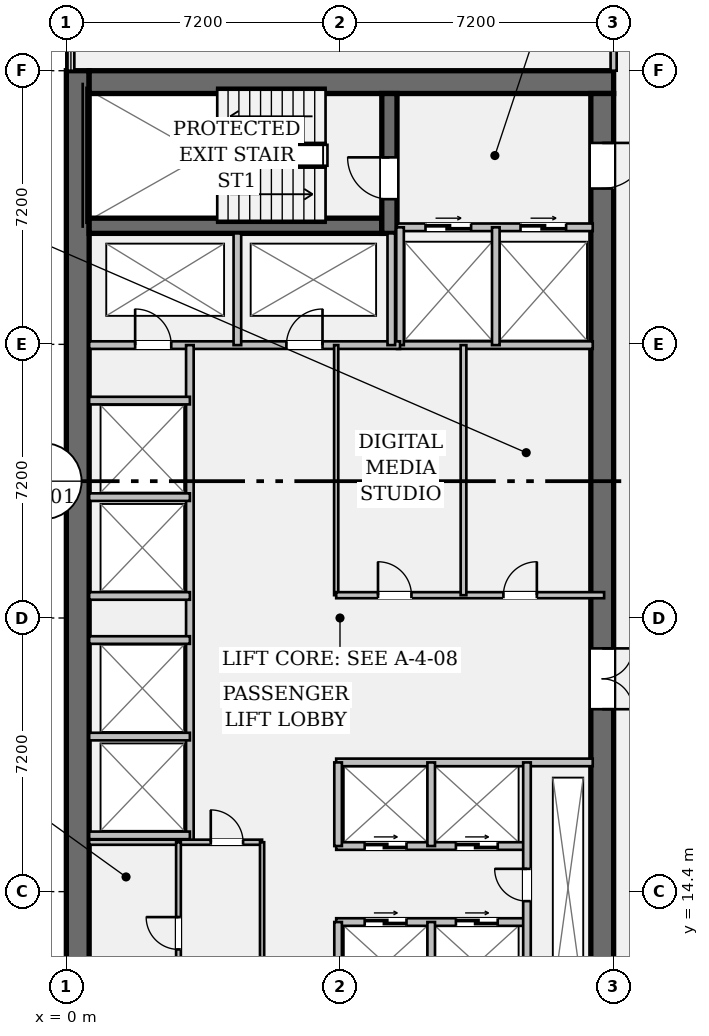
"""IFC4 building model, lengths in metres.
Left out: names, types, materials, properties, quantities, classifications, styles, units other than length and angle.
Written with IfcOpenShell. Run it as: python <this file> out.ifc"""

import sys

from ifc_helpers import new_model, si_unit, direction, frame, frame_2d, origin, place, context, subcontext, project, spatial, rectangle, extrude, element, fill, save


model = new_model("IFC4")
c1 = context("Model", 3, precision=1e-05, world=origin(), true_north=direction((0.0, 1.0)))
c2 = subcontext(c1, "Body", "Model", "MODEL_VIEW")
j1 = project(units=[si_unit("LENGTHUNIT", "METRE"), si_unit("PLANEANGLEUNIT", "RADIAN")], contexts=[c1])
p1 = place(None, origin())
s1 = spatial("IfcSite", under=j1, at=p1, CompositionType="ELEMENT")
p2 = place(p1, origin())
s2 = spatial("IfcBuilding", under=s1, at=p2, CompositionType="ELEMENT")
p3 = place(p2, frame((0.0, 0.0, 106.05)))
s3 = spatial("IfcBuildingStorey", under=s2, at=p3, CompositionType="ELEMENT", Elevation=106.05)
p4 = place(p3, frame((0.3, 7.2, 0.0), z_axis=(0.0, 0.0, 1.0), x_axis=(0.0, 1.0, 0.0)))
e1 = element("IfcWall", 1, at=p4, inside=s3, PredefinedType="SHEAR", context=c2, shape_type="SweptSolid", body=[
    extrude(rectangle(XDim=28.8, YDim=0.6, at=frame_2d((14.4, 0.0))), origin(), (0.0, 0.0, 1.0), 3.58),
])
p5 = place(p3, frame((0.6, 35.7, 0.0), z_axis=(0.0, 0.0, 1.0), x_axis=(1.0, 0.0, 0.0)))
e2 = element("IfcWall", 2, at=p5, inside=s3, PredefinedType="SHEAR", context=c2, shape_type="SweptSolid", body=[
    extrude(rectangle(XDim=13.8, YDim=0.6, at=frame_2d((6.9, 0.0))), origin(), (0.0, 0.0, 1.0), 3.58),
])
p6 = place(p3, frame((14.1, 35.4, 0.0), z_axis=(0.0, 0.0, 1.0), x_axis=(0.0, -1.0, 0.0)))
e3 = element("IfcWall", 3, at=p6, inside=s3, PredefinedType="SHEAR", context=c2, shape_type="SweptSolid", body=[
    extrude(rectangle(XDim=27.6, YDim=0.6, at=frame_2d((13.8, 0.0))), origin(), (0.0, 0.0, 1.0), 3.58),
])
p7 = place(p6, frame((1.3, 0.0, 0.0)))
e4 = element("IfcOpeningElement", 4, at=p7, cuts=e3, PredefinedType="OPENING", context=c2, shape_type="SweptSolid", body=[
    extrude(rectangle(XDim=1.2, YDim=2.15, at=frame_2d((0.6, 1.075))), frame((0.0, 0.312, 0.0), z_axis=(0.0, -1.0, 0.0), x_axis=(1.0, 0.0, 0.0)), (0.0, 0.0, 1.0), 0.624),
])
p8 = place(p6, frame((25.25, 0.0, 0.0)))
e5 = element("IfcOpeningElement", 5, at=p8, cuts=e3, PredefinedType="OPENING", context=c2, shape_type="SweptSolid", body=[
    extrude(rectangle(XDim=1.2, YDim=2.15, at=frame_2d((0.6, 1.075))), frame((0.0, 0.312, 0.0), z_axis=(0.0, -1.0, 0.0), x_axis=(1.0, 0.0, 0.0)), (0.0, 0.0, 1.0), 0.624),
])
p9 = place(p6, frame((14.6, 0.0, 0.0)))
e6 = element("IfcOpeningElement", 6, at=p9, cuts=e3, PredefinedType="OPENING", context=c2, shape_type="SweptSolid", body=[
    extrude(rectangle(XDim=1.6, YDim=2.2, at=frame_2d((0.8, 1.1))), frame((0.0, 0.312, 0.0), z_axis=(0.0, -1.0, 0.0), x_axis=(1.0, 0.0, 0.0)), (0.0, 0.0, 1.0), 0.624),
])
p10 = place(p3, frame((0.6, 31.92, 0.0), z_axis=(0.0, 0.0, 1.0), x_axis=(1.0, 0.0, 0.0)))
e7 = element("IfcWall", 7, at=p10, inside=s3, PredefinedType="SHEAR", context=c2, shape_type="SweptSolid", body=[
    extrude(rectangle(XDim=7.7, YDim=0.4, at=frame_2d((3.85, 0.0))), origin(), (0.0, 0.0, 1.0), 3.58),
])
p11 = place(p3, frame((8.5, 31.72, 0.0), z_axis=(0.0, 0.0, 1.0), x_axis=(0.0, 1.0, 0.0)))
e8 = element("IfcWall", 8, at=p11, inside=s3, PredefinedType="SHEAR", context=c2, shape_type="SweptSolid", body=[
    extrude(rectangle(XDim=3.68, YDim=0.4, at=frame_2d((1.84, 0.0))), origin(), (0.0, 0.0, 1.0), 3.58),
])
p12 = place(p11, frame((0.9, 0.0, 0.0)))
e9 = element("IfcOpeningElement", 9, at=p12, cuts=e8, PredefinedType="OPENING", context=c2, shape_type="SweptSolid", body=[
    extrude(rectangle(XDim=1.1, YDim=2.15, at=frame_2d((0.55, 1.075))), frame((0.0, 0.212, 0.0), z_axis=(0.0, -1.0, 0.0), x_axis=(1.0, 0.0, 0.0)), (0.0, 0.0, 1.0), 0.424),
])
p13 = place(p3, frame((8.7, 31.88, 0.0), z_axis=(0.0, 0.0, 1.0), x_axis=(1.0, 0.0, 0.0)))
e10 = element("IfcWall", 10, at=p13, inside=s3, PredefinedType="PARTITIONING", context=c2, shape_type="SweptSolid", body=[
    extrude(rectangle(XDim=5.15, YDim=0.2, at=frame_2d((2.575, 0.0))), origin(), (0.0, 0.0, 1.0), 3.58),
])
p14 = place(p13, frame((0.75, 0.0, 0.0)))
e11 = element("IfcOpeningElement", 11, at=p14, cuts=e10, PredefinedType="OPENING", context=c2, shape_type="SweptSolid", body=[
    extrude(rectangle(XDim=1.2, YDim=2.2, at=frame_2d((0.6, 1.1))), frame((0.0, 0.112, 0.0), z_axis=(0.0, -1.0, 0.0), x_axis=(1.0, 0.0, 0.0)), (0.0, 0.0, 1.0), 0.224),
])
p15 = place(p13, frame((3.25, 0.0, 0.0)))
e12 = element("IfcOpeningElement", 12, at=p15, cuts=e10, PredefinedType="OPENING", context=c2, shape_type="SweptSolid", body=[
    extrude(rectangle(XDim=1.2, YDim=2.2, at=frame_2d((0.6, 1.1))), frame((0.0, 0.112, 0.0), z_axis=(0.0, -1.0, 0.0), x_axis=(1.0, 0.0, 0.0)), (0.0, 0.0, 1.0), 0.224),
])
p16 = place(p3, frame((8.7, 28.78, 0.0), z_axis=(0.0, 0.0, 1.0), x_axis=(1.0, 0.0, 0.0)))
e13 = element("IfcWall", 13, at=p16, inside=s3, PredefinedType="PARTITIONING", context=c2, shape_type="SweptSolid", body=[
    extrude(rectangle(XDim=5.15, YDim=0.2, at=frame_2d((2.575, 0.0))), origin(), (0.0, 0.0, 1.0), 3.58),
])
for number, where, z_axis, x_axis in (
    (14, (8.78, 28.78, 0.0), (0.0, 0.0, 1.0), (0.0, 1.0, 0.0)),
    (15, (11.3, 28.78, 0.0), (0.0, 0.0, 1.0), (0.0, 1.0, 0.0)),
):
    element("IfcWall", number, at=place(p3, frame(where, z_axis=z_axis, x_axis=x_axis)), inside=s3, PredefinedType="PARTITIONING", context=c2, shape_type="SweptSolid", body=[
        extrude(rectangle(XDim=3.1, YDim=0.2, at=frame_2d((1.55, 0.0))), origin(), (0.0, 0.0, 1.0), 3.58),
    ])
p17 = place(p3, frame((0.6, 28.78, 0.0), z_axis=(0.0, 0.0, 1.0), x_axis=(1.0, 0.0, 0.0)))
e16 = element("IfcWall", 16, at=p17, inside=s3, PredefinedType="PARTITIONING", context=c2, shape_type="SweptSolid", body=[
    extrude(rectangle(XDim=8.18, YDim=0.2, at=frame_2d((4.09, 0.0))), origin(), (0.0, 0.0, 1.0), 3.58),
])
p18 = place(p17, frame((1.21, 0.0, 0.0)))
e17 = element("IfcOpeningElement", 17, at=p18, cuts=e16, PredefinedType="OPENING", context=c2, shape_type="SweptSolid", body=[
    extrude(rectangle(XDim=0.95, YDim=2.15, at=frame_2d((0.475, 1.075))), frame((0.0, 0.112, 0.0), z_axis=(0.0, -1.0, 0.0), x_axis=(1.0, 0.0, 0.0)), (0.0, 0.0, 1.0), 0.224),
])
p19 = place(p17, frame((5.19, 0.0, 0.0)))
e18 = element("IfcOpeningElement", 18, at=p19, cuts=e16, PredefinedType="OPENING", context=c2, shape_type="SweptSolid", body=[
    extrude(rectangle(XDim=0.95, YDim=2.15, at=frame_2d((0.475, 1.075))), frame((0.0, 0.112, 0.0), z_axis=(0.0, -1.0, 0.0), x_axis=(1.0, 0.0, 0.0)), (0.0, 0.0, 1.0), 0.224),
])
for number, where, z_axis, x_axis in (
    (19, (4.5, 28.78, 0.0), (0.0, 0.0, 1.0), (0.0, 1.0, 0.0)),
    (20, (8.55, 28.78, 0.0), (0.0, 0.0, 1.0), (0.0, 1.0, 0.0)),
):
    element("IfcWall", number, at=place(p3, frame(where, z_axis=z_axis, x_axis=x_axis)), inside=s3, PredefinedType="PARTITIONING", context=c2, shape_type="SweptSolid", body=[
        extrude(rectangle(XDim=2.94, YDim=0.2, at=frame_2d((1.47, 0.0))), origin(), (0.0, 0.0, 1.0), 3.58),
    ])
p20 = place(p3, frame((3.25, 15.7, 0.0), z_axis=(0.0, 0.0, 1.0), x_axis=(0.0, 1.0, 0.0)))
e21 = element("IfcWall", 21, at=p20, inside=s3, PredefinedType="PARTITIONING", context=c2, shape_type="SweptSolid", body=[
    extrude(rectangle(XDim=13.08, YDim=0.2, at=frame_2d((6.54, 0.0))), origin(), (0.0, 0.0, 1.0), 3.58),
])
for number, where, z_axis, x_axis in (
    (22, (0.6, 15.88, 0.0), (0.0, 0.0, 1.0), (1.0, 0.0, 0.0)),
    (23, (0.6, 18.48, 0.0), (0.0, 0.0, 1.0), (1.0, 0.0, 0.0)),
    (24, (0.6, 22.18, 0.0), (0.0, 0.0, 1.0), (1.0, 0.0, 0.0)),
    (25, (0.6, 24.78, 0.0), (0.0, 0.0, 1.0), (1.0, 0.0, 0.0)),
    (26, (0.6, 21.02, 0.0), (0.0, 0.0, 1.0), (1.0, 0.0, 0.0)),
    (27, (0.6, 27.32, 0.0), (0.0, 0.0, 1.0), (1.0, 0.0, 0.0)),
):
    element("IfcWall", number, at=place(p3, frame(where, z_axis=z_axis, x_axis=x_axis)), inside=s3, PredefinedType="PARTITIONING", context=c2, shape_type="SweptSolid", body=[
        extrude(rectangle(XDim=2.65, YDim=0.2, at=frame_2d((1.325, 0.0))), origin(), (0.0, 0.0, 1.0), 3.58),
    ])
p21 = place(p3, frame((7.1, 22.2, 0.0), z_axis=(0.0, 0.0, 1.0), x_axis=(0.0, 1.0, 0.0)))
e28 = element("IfcWall", 28, at=p21, inside=s3, PredefinedType="PARTITIONING", context=c2, shape_type="SweptSolid", body=[
    extrude(rectangle(XDim=6.58, YDim=0.11, at=frame_2d((3.29, 0.0))), origin(), (0.0, 0.0, 1.0), 3.58),
])
p22 = place(p3, frame((7.1, 22.2, 0.0), z_axis=(0.0, 0.0, 1.0), x_axis=(1.0, 0.0, 0.0)))
e29 = element("IfcWall", 29, at=p22, inside=s3, PredefinedType="PARTITIONING", context=c2, shape_type="SweptSolid", body=[
    extrude(rectangle(XDim=7.05, YDim=0.16, at=frame_2d((3.525, 0.0))), origin(), (0.0, 0.0, 1.0), 3.58),
])
p23 = place(p22, frame((1.1, 0.0, 0.0)))
e30 = element("IfcOpeningElement", 30, at=p23, cuts=e29, PredefinedType="OPENING", context=c2, shape_type="SweptSolid", body=[
    extrude(rectangle(XDim=0.88, YDim=2.15, at=frame_2d((0.44, 1.075))), frame((0.0, 0.092, 0.0), z_axis=(0.0, -1.0, 0.0), x_axis=(1.0, 0.0, 0.0)), (0.0, 0.0, 1.0), 0.184),
])
p24 = place(p22, frame((4.4, 0.0, 0.0)))
e31 = element("IfcOpeningElement", 31, at=p24, cuts=e29, PredefinedType="OPENING", context=c2, shape_type="SweptSolid", body=[
    extrude(rectangle(XDim=0.88, YDim=2.15, at=frame_2d((0.44, 1.075))), frame((0.0, 0.092, 0.0), z_axis=(0.0, -1.0, 0.0), x_axis=(1.0, 0.0, 0.0)), (0.0, 0.0, 1.0), 0.184),
])
p25 = place(p3, frame((10.45, 22.2, 0.0), z_axis=(0.0, 0.0, 1.0), x_axis=(0.0, 1.0, 0.0)))
e32 = element("IfcWall", 32, at=p25, inside=s3, PredefinedType="PARTITIONING", context=c2, shape_type="SweptSolid", body=[
    extrude(rectangle(XDim=6.58, YDim=0.15, at=frame_2d((3.29, 0.0))), origin(), (0.0, 0.0, 1.0), 3.58),
])
p26 = place(p3, frame((7.1, 17.8, 0.0), z_axis=(0.0, 0.0, 1.0), x_axis=(1.0, 0.0, 0.0)))
e33 = element("IfcWall", 33, at=p26, inside=s3, PredefinedType="PARTITIONING", context=c2, shape_type="SweptSolid", body=[
    extrude(rectangle(XDim=6.75, YDim=0.2, at=frame_2d((3.375, 0.0))), origin(), (0.0, 0.0, 1.0), 3.58),
])
p27 = place(p3, frame((7.1, 15.6, 0.0), z_axis=(0.0, 0.0, 1.0), x_axis=(1.0, 0.0, 0.0)))
e34 = element("IfcWall", 34, at=p27, inside=s3, PredefinedType="PARTITIONING", context=c2, shape_type="SweptSolid", body=[
    extrude(rectangle(XDim=5.02, YDim=0.2, at=frame_2d((2.51, 0.0))), origin(), (0.0, 0.0, 1.0), 3.58),
])
p28 = place(p27, frame((0.75, 0.0, 0.0)))
e35 = element("IfcOpeningElement", 35, at=p28, cuts=e34, PredefinedType="OPENING", context=c2, shape_type="SweptSolid", body=[
    extrude(rectangle(XDim=1.1, YDim=2.2, at=frame_2d((0.55, 1.1))), frame((0.0, 0.112, 0.0), z_axis=(0.0, -1.0, 0.0), x_axis=(1.0, 0.0, 0.0)), (0.0, 0.0, 1.0), 0.224),
])
p29 = place(p27, frame((3.15, 0.0, 0.0)))
e36 = element("IfcOpeningElement", 36, at=p29, cuts=e34, PredefinedType="OPENING", context=c2, shape_type="SweptSolid", body=[
    extrude(rectangle(XDim=1.1, YDim=2.2, at=frame_2d((0.55, 1.1))), frame((0.0, 0.112, 0.0), z_axis=(0.0, -1.0, 0.0), x_axis=(1.0, 0.0, 0.0)), (0.0, 0.0, 1.0), 0.224),
])
p30 = place(p3, frame((7.1, 13.6, 0.0), z_axis=(0.0, 0.0, 1.0), x_axis=(1.0, 0.0, 0.0)))
e37 = element("IfcWall", 37, at=p30, inside=s3, PredefinedType="PARTITIONING", context=c2, shape_type="SweptSolid", body=[
    extrude(rectangle(XDim=5.02, YDim=0.2, at=frame_2d((2.51, 0.0))), origin(), (0.0, 0.0, 1.0), 3.58),
])
p31 = place(p30, frame((0.75, 0.0, 0.0)))
e38 = element("IfcOpeningElement", 38, at=p31, cuts=e37, PredefinedType="OPENING", context=c2, shape_type="SweptSolid", body=[
    extrude(rectangle(XDim=1.1, YDim=2.2, at=frame_2d((0.55, 1.1))), frame((0.0, 0.112, 0.0), z_axis=(0.0, -1.0, 0.0), x_axis=(1.0, 0.0, 0.0)), (0.0, 0.0, 1.0), 0.224),
])
p32 = place(p30, frame((3.15, 0.0, 0.0)))
e39 = element("IfcOpeningElement", 39, at=p32, cuts=e37, PredefinedType="OPENING", context=c2, shape_type="SweptSolid", body=[
    extrude(rectangle(XDim=1.1, YDim=2.2, at=frame_2d((0.55, 1.1))), frame((0.0, 0.112, 0.0), z_axis=(0.0, -1.0, 0.0), x_axis=(1.0, 0.0, 0.0)), (0.0, 0.0, 1.0), 0.224),
])
p33 = place(p3, frame((7.15, 15.6, 0.0), z_axis=(0.0, 0.0, 1.0), x_axis=(0.0, 1.0, 0.0)))
e40 = element("IfcWall", 40, at=p33, inside=s3, PredefinedType="PARTITIONING", context=c2, shape_type="SweptSolid", body=[
    extrude(rectangle(XDim=2.2, YDim=0.2, at=frame_2d((1.1, 0.0))), origin(), (0.0, 0.0, 1.0), 3.58),
])
p34 = place(p3, frame((7.15, 11.2, 0.0), z_axis=(0.0, 0.0, 1.0), x_axis=(0.0, 1.0, 0.0)))
e41 = element("IfcWall", 41, at=p34, inside=s3, PredefinedType="PARTITIONING", context=c2, shape_type="SweptSolid", body=[
    extrude(rectangle(XDim=2.4, YDim=0.2, at=frame_2d((1.2, 0.0))), origin(), (0.0, 0.0, 1.0), 3.58),
])
p35 = place(p3, frame((9.6, 15.6, 0.0), z_axis=(0.0, 0.0, 1.0), x_axis=(0.0, 1.0, 0.0)))
e42 = element("IfcWall", 42, at=p35, inside=s3, PredefinedType="PARTITIONING", context=c2, shape_type="SweptSolid", body=[
    extrude(rectangle(XDim=2.2, YDim=0.2, at=frame_2d((1.1, 0.0))), origin(), (0.0, 0.0, 1.0), 3.58),
])
p36 = place(p3, frame((9.6, 11.2, 0.0), z_axis=(0.0, 0.0, 1.0), x_axis=(0.0, 1.0, 0.0)))
e43 = element("IfcWall", 43, at=p36, inside=s3, PredefinedType="PARTITIONING", context=c2, shape_type="SweptSolid", body=[
    extrude(rectangle(XDim=2.4, YDim=0.2, at=frame_2d((1.2, 0.0))), origin(), (0.0, 0.0, 1.0), 3.58),
])
p37 = place(p3, frame((12.12, 11.2, 0.0), z_axis=(0.0, 0.0, 1.0), x_axis=(0.0, 1.0, 0.0)))
e44 = element("IfcWall", 44, at=p37, inside=s3, PredefinedType="PARTITIONING", context=c2, shape_type="SweptSolid", body=[
    extrude(rectangle(XDim=6.6, YDim=0.2, at=frame_2d((3.3, 0.0))), origin(), (0.0, 0.0, 1.0), 3.58),
])
p38 = place(p37, frame((2.95, 0.0, 0.0)))
e45 = element("IfcOpeningElement", 45, at=p38, cuts=e44, PredefinedType="OPENING", context=c2, shape_type="SweptSolid", body=[
    extrude(rectangle(XDim=0.85, YDim=2.15, at=frame_2d((0.425, 1.075))), frame((0.0, 0.112, 0.0), z_axis=(0.0, -1.0, 0.0), x_axis=(1.0, 0.0, 0.0)), (0.0, 0.0, 1.0), 0.224),
])
p39 = place(p3, frame((0.6, 15.7, 0.0), z_axis=(0.0, 0.0, 1.0), x_axis=(1.0, 0.0, 0.0)))
e46 = element("IfcWall", 46, at=p39, inside=s3, PredefinedType="PARTITIONING", context=c2, shape_type="SweptSolid", body=[
    extrude(rectangle(XDim=4.55, YDim=0.135, at=frame_2d((2.275, 0.0))), origin(), (0.0, 0.0, 1.0), 3.58),
])
p40 = place(p39, frame((3.2, 0.0, 0.0)))
e47 = element("IfcOpeningElement", 47, at=p40, cuts=e46, PredefinedType="OPENING", context=c2, shape_type="SweptSolid", body=[
    extrude(rectangle(XDim=0.85, YDim=2.15, at=frame_2d((0.425, 1.075))), frame((0.0, 0.08, 0.0), z_axis=(0.0, -1.0, 0.0), x_axis=(1.0, 0.0, 0.0)), (0.0, 0.0, 1.0), 0.159),
])
p41 = place(p3, frame((5.15, 11.28, 0.0), z_axis=(0.0, 0.0, 1.0), x_axis=(0.0, 1.0, 0.0)))
e48 = element("IfcWall", 48, at=p41, inside=s3, PredefinedType="PARTITIONING", context=c2, shape_type="SweptSolid", body=[
    extrude(rectangle(XDim=4.42, YDim=0.11, at=frame_2d((2.21, 0.0))), origin(), (0.0, 0.0, 1.0), 3.58),
])
p42 = place(p3, frame((2.95, 11.28, 0.0), z_axis=(0.0, 0.0, 1.0), x_axis=(0.0, 1.0, 0.0)))
e49 = element("IfcWall", 49, at=p42, inside=s3, PredefinedType="PARTITIONING", context=c2, shape_type="SweptSolid", body=[
    extrude(rectangle(XDim=4.42, YDim=0.125, at=frame_2d((2.21, 0.0))), origin(), (0.0, 0.0, 1.0), 3.58),
])
p43 = place(p42, frame((1.6, 0.0, 0.0)))
e50 = element("IfcOpeningElement", 50, at=p43, cuts=e49, PredefinedType="OPENING", context=c2, shape_type="SweptSolid", body=[
    extrude(rectangle(XDim=0.85, YDim=2.15, at=frame_2d((0.425, 1.075))), frame((0.0, 0.074, 0.0), z_axis=(0.0, -1.0, 0.0), x_axis=(1.0, 0.0, 0.0)), (0.0, 0.0, 1.0), 0.149),
])
p44 = place(p3, frame((14.4, 36.0, 0.0), z_axis=(0.0, 0.0, 1.0), x_axis=(0.0, 1.0, 0.0)))
e51 = element("IfcWall", 51, at=p44, inside=s3, PredefinedType="PARTITIONING", context=c2, shape_type="SweptSolid", body=[
    extrude(rectangle(XDim=7.08, YDim=0.16, at=frame_2d((3.54, 0.0))), origin(), (0.0, 0.0, 1.0), 2.793),
])
p45 = place(p44, frame((0.85, 0.0, 0.0)))
e52 = element("IfcOpeningElement", 52, at=p45, cuts=e51, PredefinedType="OPENING", context=c2, shape_type="SweptSolid", body=[
    extrude(rectangle(XDim=0.88, YDim=2.15, at=frame_2d((0.44, 1.075))), frame((0.0, 0.092, 0.0), z_axis=(0.0, -1.0, 0.0), x_axis=(1.0, 0.0, 0.0)), (0.0, 0.0, 1.0), 0.184),
])
p46 = place(p12, origin())
e53 = element("IfcDoor", 53, at=p46, inside=s3, OperationType="SINGLE_SWING_RIGHT", PredefinedType="DOOR", context=c2, shape_type="SweptSolid", body=[
    extrude(rectangle(XDim=1.1, YDim=2.15, at=frame_2d((0.55, 1.075))), frame((0.0, 0.025, 0.0), z_axis=(0.0, -1.0, 0.0), x_axis=(1.0, 0.0, 0.0)), (0.0, 0.0, 1.0), 0.05),
])
fill(e9, e53)
p47 = place(p7, origin())
e54 = element("IfcDoor", 54, at=p47, inside=s3, OperationType="SINGLE_SWING_LEFT", PredefinedType="DOOR", context=c2, shape_type="SweptSolid", body=[
    extrude(rectangle(XDim=1.2, YDim=2.15, at=frame_2d((0.6, 1.075))), frame((0.0, 0.025, 0.0), z_axis=(0.0, -1.0, 0.0), x_axis=(1.0, 0.0, 0.0)), (0.0, 0.0, 1.0), 0.05),
])
fill(e4, e54)
p48 = place(p14, origin())
e55 = element("IfcDoor", 55, at=p48, inside=s3, OperationType="DOUBLE_DOOR_SLIDING", PredefinedType="DOOR", context=c2, shape_type="SweptSolid", body=[
    extrude(rectangle(XDim=1.2, YDim=2.2, at=frame_2d((0.6, 1.1))), frame((0.0, 0.025, 0.0), z_axis=(0.0, -1.0, 0.0), x_axis=(1.0, 0.0, 0.0)), (0.0, 0.0, 1.0), 0.05),
])
fill(e11, e55)
p49 = place(p15, origin())
e56 = element("IfcDoor", 56, at=p49, inside=s3, OperationType="DOUBLE_DOOR_SLIDING", PredefinedType="DOOR", context=c2, shape_type="SweptSolid", body=[
    extrude(rectangle(XDim=1.2, YDim=2.2, at=frame_2d((0.6, 1.1))), frame((0.0, 0.025, 0.0), z_axis=(0.0, -1.0, 0.0), x_axis=(1.0, 0.0, 0.0)), (0.0, 0.0, 1.0), 0.05),
])
fill(e12, e56)
p50 = place(p18, origin())
e57 = element("IfcDoor", 57, at=p50, inside=s3, OperationType="SINGLE_SWING_LEFT", PredefinedType="DOOR", context=c2, shape_type="SweptSolid", body=[
    extrude(rectangle(XDim=0.95, YDim=2.15, at=frame_2d((0.475, 1.075))), frame((0.0, 0.025, 0.0), z_axis=(0.0, -1.0, 0.0), x_axis=(1.0, 0.0, 0.0)), (0.0, 0.0, 1.0), 0.05),
])
fill(e17, e57)
p51 = place(p19, origin())
e58 = element("IfcDoor", 58, at=p51, inside=s3, OperationType="SINGLE_SWING_RIGHT", PredefinedType="DOOR", context=c2, shape_type="SweptSolid", body=[
    extrude(rectangle(XDim=0.95, YDim=2.15, at=frame_2d((0.475, 1.075))), frame((0.0, 0.025, 0.0), z_axis=(0.0, -1.0, 0.0), x_axis=(1.0, 0.0, 0.0)), (0.0, 0.0, 1.0), 0.05),
])
fill(e18, e58)
p52 = place(p9, origin())
e59 = element("IfcDoor", 59, at=p52, inside=s3, OperationType="DOUBLE_DOOR_SINGLE_SWING", PredefinedType="DOOR", context=c2, shape_type="SweptSolid", body=[
    extrude(rectangle(XDim=1.6, YDim=2.2, at=frame_2d((0.8, 1.1))), frame((0.0, 0.025, 0.0), z_axis=(0.0, -1.0, 0.0), x_axis=(1.0, 0.0, 0.0)), (0.0, 0.0, 1.0), 0.05),
])
fill(e6, e59)
p53 = place(p23, origin())
e60 = element("IfcDoor", 60, at=p53, inside=s3, OperationType="SINGLE_SWING_LEFT", PredefinedType="DOOR", context=c2, shape_type="SweptSolid", body=[
    extrude(rectangle(XDim=0.88, YDim=2.15, at=frame_2d((0.44, 1.075))), frame((0.0, 0.025, 0.0), z_axis=(0.0, -1.0, 0.0), x_axis=(1.0, 0.0, 0.0)), (0.0, 0.0, 1.0), 0.05),
])
fill(e30, e60)
p54 = place(p24, origin())
e61 = element("IfcDoor", 61, at=p54, inside=s3, OperationType="SINGLE_SWING_RIGHT", PredefinedType="DOOR", context=c2, shape_type="SweptSolid", body=[
    extrude(rectangle(XDim=0.88, YDim=2.15, at=frame_2d((0.44, 1.075))), frame((0.0, 0.025, 0.0), z_axis=(0.0, -1.0, 0.0), x_axis=(1.0, 0.0, 0.0)), (0.0, 0.0, 1.0), 0.05),
])
fill(e31, e61)
p55 = place(p38, origin())
e62 = element("IfcDoor", 62, at=p55, inside=s3, OperationType="SINGLE_SWING_RIGHT", PredefinedType="DOOR", context=c2, shape_type="SweptSolid", body=[
    extrude(rectangle(XDim=0.85, YDim=2.15, at=frame_2d((0.425, 1.075))), frame((0.0, 0.025, 0.0), z_axis=(0.0, -1.0, 0.0), x_axis=(1.0, 0.0, 0.0)), (0.0, 0.0, 1.0), 0.05),
])
fill(e45, e62)
p56 = place(p28, origin())
e63 = element("IfcDoor", 63, at=p56, inside=s3, OperationType="DOUBLE_DOOR_SLIDING", PredefinedType="DOOR", context=c2, shape_type="SweptSolid", body=[
    extrude(rectangle(XDim=1.1, YDim=2.2, at=frame_2d((0.55, 1.1))), frame((0.0, 0.025, 0.0), z_axis=(0.0, -1.0, 0.0), x_axis=(1.0, 0.0, 0.0)), (0.0, 0.0, 1.0), 0.05),
])
fill(e35, e63)
p57 = place(p29, origin())
e64 = element("IfcDoor", 64, at=p57, inside=s3, OperationType="DOUBLE_DOOR_SLIDING", PredefinedType="DOOR", context=c2, shape_type="SweptSolid", body=[
    extrude(rectangle(XDim=1.1, YDim=2.2, at=frame_2d((0.55, 1.1))), frame((0.0, 0.025, 0.0), z_axis=(0.0, -1.0, 0.0), x_axis=(1.0, 0.0, 0.0)), (0.0, 0.0, 1.0), 0.05),
])
fill(e36, e64)
p58 = place(p31, origin())
e65 = element("IfcDoor", 65, at=p58, inside=s3, OperationType="DOUBLE_DOOR_SLIDING", PredefinedType="DOOR", context=c2, shape_type="SweptSolid", body=[
    extrude(rectangle(XDim=1.1, YDim=2.2, at=frame_2d((0.55, 1.1))), frame((0.0, 0.025, 0.0), z_axis=(0.0, -1.0, 0.0), x_axis=(1.0, 0.0, 0.0)), (0.0, 0.0, 1.0), 0.05),
])
fill(e38, e65)
p59 = place(p32, origin())
e66 = element("IfcDoor", 66, at=p59, inside=s3, OperationType="DOUBLE_DOOR_SLIDING", PredefinedType="DOOR", context=c2, shape_type="SweptSolid", body=[
    extrude(rectangle(XDim=1.1, YDim=2.2, at=frame_2d((0.55, 1.1))), frame((0.0, 0.025, 0.0), z_axis=(0.0, -1.0, 0.0), x_axis=(1.0, 0.0, 0.0)), (0.0, 0.0, 1.0), 0.05),
])
fill(e39, e66)
p60 = place(p40, origin())
e67 = element("IfcDoor", 67, at=p60, inside=s3, OperationType="SINGLE_SWING_LEFT", PredefinedType="DOOR", context=c2, shape_type="SweptSolid", body=[
    extrude(rectangle(XDim=0.85, YDim=2.15, at=frame_2d((0.425, 1.075))), frame((0.0, 0.025, 0.0), z_axis=(0.0, -1.0, 0.0), x_axis=(1.0, 0.0, 0.0)), (0.0, 0.0, 1.0), 0.05),
])
fill(e47, e67)
p61 = place(p43, origin())
e68 = element("IfcDoor", 68, at=p61, inside=s3, OperationType="SINGLE_SWING_RIGHT", PredefinedType="DOOR", context=c2, shape_type="SweptSolid", body=[
    extrude(rectangle(XDim=0.85, YDim=2.15, at=frame_2d((0.425, 1.075))), frame((0.0, 0.025, 0.0), z_axis=(0.0, -1.0, 0.0), x_axis=(1.0, 0.0, 0.0)), (0.0, 0.0, 1.0), 0.05),
])
fill(e50, e68)
save(model, sys.argv[1])
